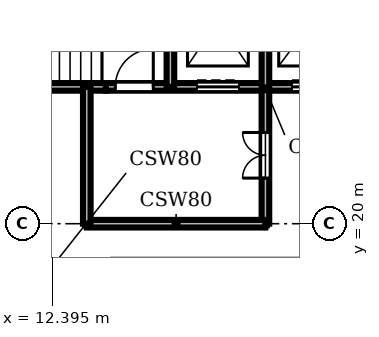
"""IFC4 building model, lengths in metres.
Left out: names, types, materials, properties, quantities, classifications, styles, units other than length and angle.
Written with IfcOpenShell. Run it as: python <this file> out.ifc"""

import sys

from ifc_helpers import new_model, si_unit, direction, frame, frame_2d, origin, place, context, subcontext, project, spatial, rectangle, extrude, element, fill, save


model = new_model("IFC4")
c1 = context("Model", 3, precision=1e-05, world=origin(), true_north=direction((0.0, 1.0)))
c2 = subcontext(c1, "Body", "Model", "MODEL_VIEW")
j1 = project(units=[si_unit("LENGTHUNIT", "METRE"), si_unit("PLANEANGLEUNIT", "RADIAN")], contexts=[c1])
p1 = place(None, origin())
s1 = spatial("IfcSite", under=j1, at=p1, CompositionType="ELEMENT")
p2 = place(p1, origin())
s2 = spatial("IfcBuilding", under=s1, at=p2, CompositionType="ELEMENT")
p3 = place(p2, frame((0.0, 0.0, 70.5)))
s3 = spatial("IfcBuildingStorey", under=s2, at=p3, CompositionType="ELEMENT", Elevation=70.5)
p4 = place(p3, frame((13.3, 20.0, 0.0), z_axis=(0.0, 0.0, 1.0), x_axis=(1.0, 0.0, 0.0)))
e1 = element("IfcWall", 1, at=p4, inside=s3, PredefinedType="SHEAR", context=c2, shape_type="SweptSolid", body=[
    extrude(rectangle(XDim=4.7, YDim=0.2, at=frame_2d((2.35, 0.0))), origin(), (0.0, 0.0, 1.0), 3.58),
])
p5 = place(p3, frame((8.9, 23.6, 0.0), z_axis=(0.0, 0.0, 1.0), x_axis=(1.0, 0.0, 0.0)))
e2 = element("IfcWall", 2, at=p5, inside=s3, PredefinedType="SHEAR", context=c2, shape_type="SweptSolid", body=[
    extrude(rectangle(XDim=4.9, YDim=0.2, at=frame_2d((2.45, 0.0))), origin(), (0.0, 0.0, 1.0), 3.58),
])
p6 = place(p3, frame((13.8, 23.6, 0.0), z_axis=(0.0, 0.0, 1.0), x_axis=(1.0, 0.0, 0.0)))
e3 = element("IfcWall", 3, at=p6, inside=s3, PredefinedType="SHEAR", context=c2, shape_type="SweptSolid", body=[
    extrude(rectangle(XDim=13.3, YDim=0.2, at=frame_2d((6.65, 0.0))), origin(), (0.0, 0.0, 1.0), 3.58),
])
p7 = place(p6, frame((2.4, 0.0, 0.0)))
e4 = element("IfcOpeningElement", 4, at=p7, cuts=e3, PredefinedType="OPENING", context=c2, shape_type="SweptSolid", body=[
    extrude(rectangle(XDim=1.1, YDim=2.1, at=frame_2d((0.55, 1.05))), frame((0.0, 0.11, 0.0), z_axis=(0.0, -1.0, 0.0), x_axis=(1.0, 0.0, 0.0)), (0.0, 0.0, 1.0), 0.22),
])
p8 = place(p6, frame((4.9, 0.0, 0.0)))
e5 = element("IfcOpeningElement", 5, at=p8, cuts=e3, PredefinedType="OPENING", context=c2, shape_type="SweptSolid", body=[
    extrude(rectangle(XDim=1.1, YDim=2.1, at=frame_2d((0.55, 1.05))), frame((0.0, 0.11, 0.0), z_axis=(0.0, -1.0, 0.0), x_axis=(1.0, 0.0, 0.0)), (0.0, 0.0, 1.0), 0.22),
])
p9 = place(p6, frame((0.25, 0.0, 0.0)))
e6 = element("IfcOpeningElement", 6, at=p9, cuts=e3, PredefinedType="OPENING", context=c2, shape_type="SweptSolid", body=[
    extrude(rectangle(XDim=1.0, YDim=2.1, at=frame_2d((0.5, 1.05))), frame((0.0, 0.11, 0.0), z_axis=(0.0, -1.0, 0.0), x_axis=(1.0, 0.0, 0.0)), (0.0, 0.0, 1.0), 0.22),
])
p10 = place(p3, frame((13.3, 20.0, 0.0), z_axis=(0.0, 0.0, 1.0), x_axis=(0.0, 1.0, 0.0)))
e7 = element("IfcWall", 7, at=p10, inside=s3, PredefinedType="SHEAR", context=c2, shape_type="SweptSolid", body=[
    extrude(rectangle(XDim=3.6, YDim=0.2, at=frame_2d((1.8, 0.0))), origin(), (0.0, 0.0, 1.0), 3.58),
])
p11 = place(p3, frame((15.5, 23.6, 0.0), z_axis=(0.0, 0.0, 1.0), x_axis=(0.0, 1.0, 0.0)))
e8 = element("IfcWall", 8, at=p11, inside=s3, PredefinedType="SHEAR", context=c2, shape_type="SweptSolid", body=[
    extrude(rectangle(XDim=3.5, YDim=0.2, at=frame_2d((1.75, 0.0))), origin(), (0.0, 0.0, 1.0), 3.58),
])
p12 = place(p3, frame((18.0, 20.0, 0.0), z_axis=(0.0, 0.0, 1.0), x_axis=(0.0, 1.0, 0.0)))
e9 = element("IfcWall", 9, at=p12, inside=s3, PredefinedType="SHEAR", context=c2, shape_type="SweptSolid", body=[
    extrude(rectangle(XDim=7.1, YDim=0.2, at=frame_2d((3.55, 0.0))), origin(), (0.0, 0.0, 1.0), 3.58),
])
p13 = place(p12, frame((1.2, 0.0, 0.0)))
e10 = element("IfcOpeningElement", 10, at=p13, cuts=e9, PredefinedType="OPENING", context=c2, shape_type="SweptSolid", body=[
    extrude(rectangle(XDim=1.2, YDim=2.1, at=frame_2d((0.6, 1.05))), frame((0.0, 0.11, 0.0), z_axis=(0.0, -1.0, 0.0), x_axis=(1.0, 0.0, 0.0)), (0.0, 0.0, 1.0), 0.22),
])
p14 = place(p7, origin())
e11 = element("IfcDoor", 11, at=p14, inside=s3, OperationType="DOUBLE_DOOR_SLIDING", PredefinedType="DOOR", context=c2, shape_type="SweptSolid", body=[
    extrude(rectangle(XDim=1.1, YDim=2.1, at=frame_2d((0.55, 1.05))), frame((0.0, 0.025, 0.0), z_axis=(0.0, -1.0, 0.0), x_axis=(1.0, 0.0, 0.0)), (0.0, 0.0, 1.0), 0.05),
])
fill(e4, e11)
p15 = place(p8, origin())
e12 = element("IfcDoor", 12, at=p15, inside=s3, OperationType="DOUBLE_DOOR_SLIDING", PredefinedType="DOOR", context=c2, shape_type="SweptSolid", body=[
    extrude(rectangle(XDim=1.1, YDim=2.1, at=frame_2d((0.55, 1.05))), frame((0.0, 0.025, 0.0), z_axis=(0.0, -1.0, 0.0), x_axis=(1.0, 0.0, 0.0)), (0.0, 0.0, 1.0), 0.05),
])
fill(e5, e12)
p16 = place(p9, origin())
e13 = element("IfcDoor", 13, at=p16, inside=s3, OperationType="SINGLE_SWING_RIGHT", PredefinedType="DOOR", context=c2, shape_type="SweptSolid", body=[
    extrude(rectangle(XDim=1.0, YDim=2.1, at=frame_2d((0.5, 1.05))), frame((0.0, 0.025, 0.0), z_axis=(0.0, -1.0, 0.0), x_axis=(1.0, 0.0, 0.0)), (0.0, 0.0, 1.0), 0.05),
])
fill(e6, e13)
p17 = place(p13, origin())
e14 = element("IfcDoor", 14, at=p17, inside=s3, OperationType="DOUBLE_DOOR_SINGLE_SWING", PredefinedType="DOOR", context=c2, shape_type="SweptSolid", body=[
    extrude(rectangle(XDim=1.2, YDim=2.1, at=frame_2d((0.6, 1.05))), frame((0.0, 0.025, 0.0), z_axis=(0.0, -1.0, 0.0), x_axis=(1.0, 0.0, 0.0)), (0.0, 0.0, 1.0), 0.05),
])
fill(e10, e14)
save(model, sys.argv[1])
